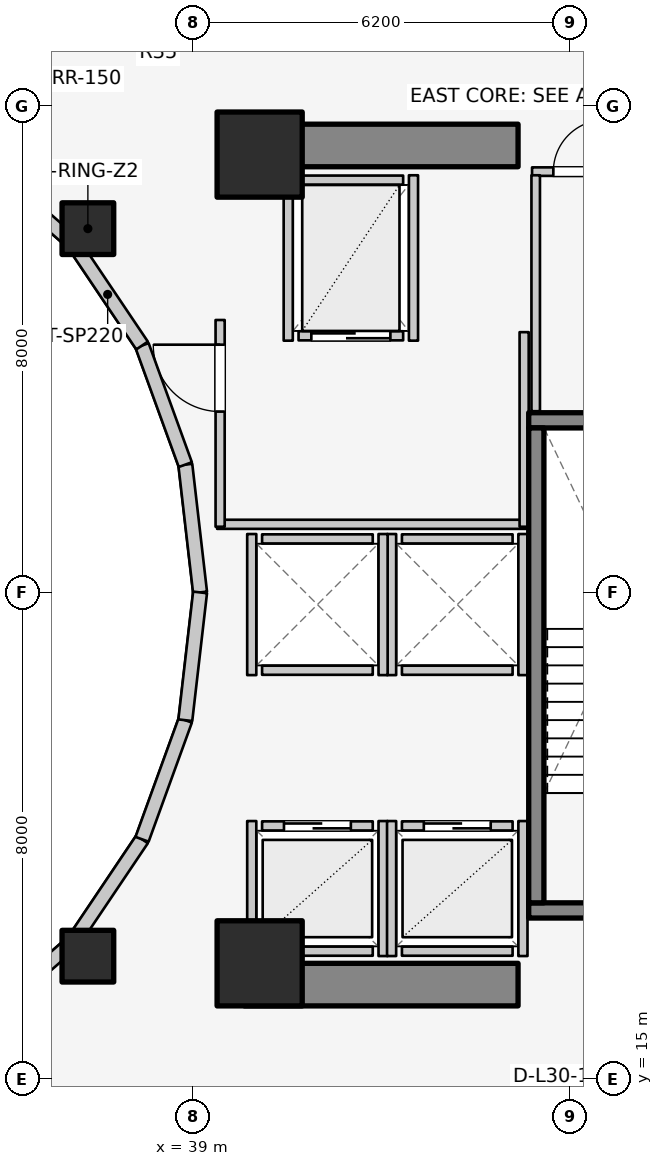
"""IFC4 building model, lengths in metres.
Left out: names, types, materials, properties, quantities, classifications, styles, units other than length and angle.
Written with IfcOpenShell. Run it as: python <this file> out.ifc"""

import sys

from ifc_helpers import new_model, si_unit, direction, frame, frame_2d, origin, origin_2d, place, context, subcontext, project, spatial, rectangle, extrude, element, fill, save


model = new_model("IFC4")
c1 = context("Model", 3, precision=1e-05, world=origin(), true_north=direction((0.0, 1.0)))
c2 = subcontext(c1, "Body", "Model", "MODEL_VIEW")
j1 = project(units=[si_unit("LENGTHUNIT", "METRE"), si_unit("PLANEANGLEUNIT", "RADIAN")], contexts=[c1])
p1 = place(None, origin())
s1 = spatial("IfcSite", under=j1, at=p1, CompositionType="ELEMENT")
p2 = place(p1, origin())
s2 = spatial("IfcBuilding", under=s1, at=p2, CompositionType="ELEMENT")
p3 = place(p2, frame((0.0, 0.0, 101.1)))
s3 = spatial("IfcBuildingStorey", under=s2, at=p3, CompositionType="ELEMENT", Elevation=101.1)
for number, where, z_axis, x_axis in (
    (1, (39.85, 16.55, 0.0), (0.0, 0.0, 1.0), (1.0, 0.0, 0.0)),
    (2, (39.85, 30.35, 0.0), (0.0, 0.0, 1.0), (1.0, 0.0, 0.0)),
):
    element("IfcWall", number, at=place(p3, frame(where, z_axis=z_axis, x_axis=x_axis)), inside=s3, PredefinedType="SHEAR", context=c2, shape_type="SweptSolid", body=[
        extrude(rectangle(XDim=4.5, YDim=0.7, at=frame_2d((2.25, 0.0))), origin(), (0.0, 0.0, 1.0), 3.1),
    ])
p4 = place(p3, frame((44.525, 17.77, 0.0), z_axis=(0.0, 0.0, 1.0), x_axis=(1.0, 0.0, 0.0)))
e3 = element("IfcWall", 3, at=p4, inside=s3, PredefinedType="SOLIDWALL", context=c2, shape_type="SweptSolid", body=[
    extrude(rectangle(XDim=3.37, YDim=0.25, at=frame_2d((1.685, 0.0))), origin(), (0.0, 0.0, 1.0), 3.1),
])
p5 = place(p4, frame((1.135, 0.0, 0.0)))
e4 = element("IfcOpeningElement", 4, at=p5, cuts=e3, PredefinedType="OPENING", context=c2, shape_type="SweptSolid", body=[
    extrude(rectangle(XDim=1.1, YDim=2.1, at=frame_2d((0.55, 1.05))), frame((0.0, 0.135, 0.0), z_axis=(0.0, -1.0, 0.0), x_axis=(1.0, 0.0, 0.0)), (0.0, 0.0, 1.0), 0.27),
])
p6 = place(p3, frame((44.525, 25.83, 0.0), z_axis=(0.0, 0.0, 1.0), x_axis=(1.0, 0.0, 0.0)))
e5 = element("IfcWall", 5, at=p6, inside=s3, PredefinedType="SOLIDWALL", context=c2, shape_type="SweptSolid", body=[
    extrude(rectangle(XDim=3.37, YDim=0.25, at=frame_2d((1.685, 0.0))), origin(), (0.0, 0.0, 1.0), 3.1),
])
p7 = place(p3, frame((44.65, 17.895, 0.0), z_axis=(0.0, 0.0, 1.0), x_axis=(0.0, 1.0, 0.0)))
e6 = element("IfcWall", 6, at=p7, inside=s3, PredefinedType="SOLIDWALL", context=c2, shape_type="SweptSolid", body=[
    extrude(rectangle(XDim=7.81, YDim=0.25, at=frame_2d((3.905, 0.0))), origin(), (0.0, 0.0, 1.0), 3.1),
])
for number, where, z_axis, x_axis in (
    (7, (40.1, 16.9, 0.0), (0.0, 0.0, 1.0), (1.0, 0.0, 0.0)),
    (8, (40.1, 30.2, 0.0), (0.0, 0.0, 1.0), (1.0, 0.0, 0.0)),
):
    element("IfcColumn", number, at=place(p3, frame(where, z_axis=z_axis, x_axis=x_axis)), inside=s3, PredefinedType="COLUMN", context=c2, shape_type="SweptSolid", body=[
        extrude(rectangle(XDim=1.4, YDim=1.4, at=origin_2d()), origin(), (0.0, 0.0, 1.0), 3.1),
    ])
for number, where, z_axis, x_axis in (
    (9, (37.275, 28.982, 0.0), (0.0, 0.0, 1.0), (1.0, 0.0, 0.0)),
    (10, (37.275, 17.018, 0.0), (0.0, 0.0, 1.0), (1.0, 0.0, 0.0)),
):
    element("IfcColumn", number, at=place(p3, frame(where, z_axis=z_axis, x_axis=x_axis)), inside=s3, PredefinedType="COLUMN", context=c2, shape_type="SweptSolid", body=[
        extrude(rectangle(XDim=0.85, YDim=0.85, at=origin_2d()), origin(), (0.0, 0.0, 1.0), 3.1),
    ])
p8 = place(p3, frame((39.12, 23.0, 0.0), z_axis=(0.0, 0.0, 1.0), x_axis=(-0.114711713601, 0.993398823617, 0.0)))
e11 = element("IfcWall", 11, at=p8, inside=s3, PredefinedType="STANDARD", context=c2, shape_type="SweptSolid", body=[
    extrude(rectangle(XDim=2.115, YDim=0.23, at=frame_2d((1.058, 0.0))), origin(), (0.0, 0.0, 1.0), 2.56),
])
p9 = place(p3, frame((38.877, 25.102, 0.0), z_axis=(0.0, 0.0, 1.0), x_axis=(-0.341423187295, 0.93990968033, 0.0)))
e12 = element("IfcWall", 12, at=p9, inside=s3, PredefinedType="STANDARD", context=c2, shape_type="SweptSolid", body=[
    extrude(rectangle(XDim=2.084, YDim=0.23, at=frame_2d((1.042, 0.0))), origin(), (0.0, 0.0, 1.0), 2.56),
])
p10 = place(p3, frame((38.166, 27.06, 0.0), z_axis=(0.0, 0.0, 1.0), x_axis=(-0.558197800898, 0.829707909492, 0.0)))
e13 = element("IfcWall", 13, at=p10, inside=s3, PredefinedType="STANDARD", context=c2, shape_type="SweptSolid", body=[
    extrude(rectangle(XDim=2.027, YDim=0.23, at=frame_2d((1.013, 0.0))), origin(), (0.0, 0.0, 1.0), 1.22),
])
for number, where, z_axis, x_axis in (
    (14, (37.035, 28.742, 0.0), (0.0, 0.0, 1.0), (-0.753, 0.659, 0.0)),
    (15, (35.56, 15.968, 0.0), (0.0, 0.0, 1.0), (0.753, 0.659, 0.0)),
):
    element("IfcWall", number, at=place(p3, frame(where, z_axis=z_axis, x_axis=x_axis)), inside=s3, PredefinedType="STANDARD", context=c2, shape_type="SweptSolid", body=[
        extrude(rectangle(XDim=1.959, YDim=0.23, at=frame_2d((0.98, 0.0))), origin(), (0.0, 0.0, 1.0), 1.22),
    ])
p11 = place(p3, frame((37.035, 17.258, 0.0), z_axis=(0.0, 0.0, 1.0), x_axis=(0.558197800898, 0.829707909492, 0.0)))
e16 = element("IfcWall", 16, at=p11, inside=s3, PredefinedType="STANDARD", context=c2, shape_type="SweptSolid", body=[
    extrude(rectangle(XDim=2.027, YDim=0.23, at=frame_2d((1.013, 0.0))), origin(), (0.0, 0.0, 1.0), 1.22),
])
p12 = place(p3, frame((38.166, 18.94, 0.0), z_axis=(0.0, 0.0, 1.0), x_axis=(0.341423187295, 0.93990968033, 0.0)))
e17 = element("IfcWall", 17, at=p12, inside=s3, PredefinedType="STANDARD", context=c2, shape_type="SweptSolid", body=[
    extrude(rectangle(XDim=2.084, YDim=0.23, at=frame_2d((1.042, 0.0))), origin(), (0.0, 0.0, 1.0), 2.56),
])
p13 = place(p3, frame((38.877, 20.898, 0.0), z_axis=(0.0, 0.0, 1.0), x_axis=(0.114711713601, 0.993398823617, 0.0)))
e18 = element("IfcWall", 18, at=p13, inside=s3, PredefinedType="STANDARD", context=c2, shape_type="SweptSolid", body=[
    extrude(rectangle(XDim=2.115, YDim=0.23, at=frame_2d((1.058, 0.0))), origin(), (0.0, 0.0, 1.0), 2.56),
])
p14 = place(p3, frame((40.14, 19.16, 0.0), z_axis=(0.0, 0.0, 1.0), x_axis=(1.0, 0.0, 0.0)))
e19 = element("IfcWall", 19, at=p14, inside=s3, PredefinedType="SOLIDWALL", context=c2, shape_type="SweptSolid", body=[
    extrude(rectangle(XDim=1.82, YDim=0.15, at=frame_2d((0.91, 0.0))), origin(), (0.0, 0.0, 1.0), 2.12),
])
p15 = place(p14, frame((0.36, 0.0, 0.0)))
e20 = element("IfcOpeningElement", 20, at=p15, cuts=e19, PredefinedType="OPENING", context=c2, shape_type="SweptSolid", body=[
    extrude(rectangle(XDim=1.1, YDim=2.1, at=frame_2d((0.55, 1.05))), frame((0.0, 0.085, 0.0), z_axis=(0.0, -1.0, 0.0), x_axis=(1.0, 0.0, 0.0)), (0.0, 0.0, 1.0), 0.17),
])
p16 = place(p3, frame((40.14, 17.1, 0.0), z_axis=(0.0, 0.0, 1.0), x_axis=(1.0, 0.0, 0.0)))
e21 = element("IfcWall", 21, at=p16, inside=s3, PredefinedType="SOLIDWALL", context=c2, shape_type="SweptSolid", body=[
    extrude(rectangle(XDim=1.82, YDim=0.15, at=frame_2d((0.91, 0.0))), origin(), (0.0, 0.0, 1.0), 2.12),
])
p17 = place(p3, frame((39.97, 17.02, 0.0), z_axis=(0.0, 0.0, 1.0), x_axis=(0.0, 1.0, 0.0)))
e22 = element("IfcWall", 22, at=p17, inside=s3, PredefinedType="SOLIDWALL", context=c2, shape_type="SweptSolid", body=[
    extrude(rectangle(XDim=2.22, YDim=0.15, at=frame_2d((1.11, 0.0))), origin(), (0.0, 0.0, 1.0), 1.873),
])
p18 = place(p3, frame((42.13, 17.02, 0.0), z_axis=(0.0, 0.0, 1.0), x_axis=(0.0, 1.0, 0.0)))
e23 = element("IfcWall", 23, at=p18, inside=s3, PredefinedType="SOLIDWALL", context=c2, shape_type="SweptSolid", body=[
    extrude(rectangle(XDim=2.22, YDim=0.15, at=frame_2d((1.11, 0.0))), origin(), (0.0, 0.0, 1.0), 2.575),
])
p19 = place(p3, frame((42.44, 19.16, 0.0), z_axis=(0.0, 0.0, 1.0), x_axis=(1.0, 0.0, 0.0)))
e24 = element("IfcWall", 24, at=p19, inside=s3, PredefinedType="SOLIDWALL", context=c2, shape_type="SweptSolid", body=[
    extrude(rectangle(XDim=1.82, YDim=0.15, at=frame_2d((0.91, 0.0))), origin(), (0.0, 0.0, 1.0), 2.575),
])
p20 = place(p19, frame((0.36, 0.0, 0.0)))
e25 = element("IfcOpeningElement", 25, at=p20, cuts=e24, PredefinedType="OPENING", context=c2, shape_type="SweptSolid", body=[
    extrude(rectangle(XDim=1.1, YDim=2.1, at=frame_2d((0.55, 1.05))), frame((0.0, 0.085, 0.0), z_axis=(0.0, -1.0, 0.0), x_axis=(1.0, 0.0, 0.0)), (0.0, 0.0, 1.0), 0.17),
])
p21 = place(p3, frame((42.44, 17.1, 0.0), z_axis=(0.0, 0.0, 1.0), x_axis=(1.0, 0.0, 0.0)))
e26 = element("IfcWall", 26, at=p21, inside=s3, PredefinedType="SOLIDWALL", context=c2, shape_type="SweptSolid", body=[
    extrude(rectangle(XDim=1.82, YDim=0.15, at=frame_2d((0.91, 0.0))), origin(), (0.0, 0.0, 1.0), 2.575),
])
p22 = place(p3, frame((42.27, 17.02, 0.0), z_axis=(0.0, 0.0, 1.0), x_axis=(0.0, 1.0, 0.0)))
e27 = element("IfcWall", 27, at=p22, inside=s3, PredefinedType="SOLIDWALL", context=c2, shape_type="SweptSolid", body=[
    extrude(rectangle(XDim=2.22, YDim=0.15, at=frame_2d((1.11, 0.0))), origin(), (0.0, 0.0, 1.0), 2.575),
])
p23 = place(p3, frame((44.43, 17.02, 0.0), z_axis=(0.0, 0.0, 1.0), x_axis=(0.0, 1.0, 0.0)))
e28 = element("IfcWall", 28, at=p23, inside=s3, PredefinedType="SOLIDWALL", context=c2, shape_type="SweptSolid", body=[
    extrude(rectangle(XDim=2.22, YDim=0.15, at=frame_2d((1.11, 0.0))), origin(), (0.0, 0.0, 1.0), 2.12),
])
for number, where, z_axis, x_axis in (
    (29, (42.44, 21.72, 0.0), (0.0, 0.0, 1.0), (1.0, 0.0, 0.0)),
    (30, (42.44, 23.88, 0.0), (0.0, 0.0, 1.0), (1.0, 0.0, 0.0)),
):
    element("IfcWall", number, at=place(p3, frame(where, z_axis=z_axis, x_axis=x_axis)), inside=s3, PredefinedType="SOLIDWALL", context=c2, shape_type="SweptSolid", body=[
        extrude(rectangle(XDim=1.82, YDim=0.15, at=frame_2d((0.91, 0.0))), origin(), (0.0, 0.0, 1.0), 2.575),
    ])
for number, where, z_axis, x_axis in (
    (31, (42.27, 21.64, 0.0), (0.0, 0.0, 1.0), (0.0, 1.0, 0.0)),
    (32, (44.43, 21.64, 0.0), (0.0, 0.0, 1.0), (0.0, 1.0, 0.0)),
):
    element("IfcWall", number, at=place(p3, frame(where, z_axis=z_axis, x_axis=x_axis)), inside=s3, PredefinedType="SOLIDWALL", context=c2, shape_type="SweptSolid", body=[
        extrude(rectangle(XDim=2.32, YDim=0.15, at=frame_2d((1.16, 0.0))), origin(), (0.0, 0.0, 1.0), 2.575),
    ])
for number, where, z_axis, x_axis in (
    (33, (40.14, 21.72, 0.0), (0.0, 0.0, 1.0), (1.0, 0.0, 0.0)),
    (34, (40.14, 23.88, 0.0), (0.0, 0.0, 1.0), (1.0, 0.0, 0.0)),
):
    element("IfcWall", number, at=place(p3, frame(where, z_axis=z_axis, x_axis=x_axis)), inside=s3, PredefinedType="SOLIDWALL", context=c2, shape_type="SweptSolid", body=[
        extrude(rectangle(XDim=1.82, YDim=0.15, at=frame_2d((0.91, 0.0))), origin(), (0.0, 0.0, 1.0), 2.12),
    ])
p24 = place(p3, frame((39.97, 21.64, 0.0), z_axis=(0.0, 0.0, 1.0), x_axis=(0.0, 1.0, 0.0)))
e35 = element("IfcWall", 35, at=p24, inside=s3, PredefinedType="SOLIDWALL", context=c2, shape_type="SweptSolid", body=[
    extrude(rectangle(XDim=2.32, YDim=0.15, at=frame_2d((1.16, 0.0))), origin(), (0.0, 0.0, 1.0), 2.12),
])
p25 = place(p3, frame((42.13, 21.64, 0.0), z_axis=(0.0, 0.0, 1.0), x_axis=(0.0, 1.0, 0.0)))
e36 = element("IfcWall", 36, at=p25, inside=s3, PredefinedType="SOLIDWALL", context=c2, shape_type="SweptSolid", body=[
    extrude(rectangle(XDim=2.32, YDim=0.15, at=frame_2d((1.16, 0.0))), origin(), (0.0, 0.0, 1.0), 2.575),
])
p26 = place(p3, frame((40.74, 27.22, 0.0), z_axis=(0.0, 0.0, 1.0), x_axis=(1.0, 0.0, 0.0)))
e37 = element("IfcWall", 37, at=p26, inside=s3, PredefinedType="SOLIDWALL", context=c2, shape_type="SweptSolid", body=[
    extrude(rectangle(XDim=1.72, YDim=0.15, at=frame_2d((0.86, 0.0))), origin(), (0.0, 0.0, 1.0), 2.575),
])
p27 = place(p26, frame((0.21, 0.0, 0.0)))
e38 = element("IfcOpeningElement", 38, at=p27, cuts=e37, PredefinedType="OPENING", context=c2, shape_type="SweptSolid", body=[
    extrude(rectangle(XDim=1.3, YDim=2.1, at=frame_2d((0.65, 1.05))), frame((0.0, 0.085, 0.0), z_axis=(0.0, -1.0, 0.0), x_axis=(1.0, 0.0, 0.0)), (0.0, 0.0, 1.0), 0.17),
])
p28 = place(p3, frame((40.74, 29.78, 0.0), z_axis=(0.0, 0.0, 1.0), x_axis=(1.0, 0.0, 0.0)))
e39 = element("IfcWall", 39, at=p28, inside=s3, PredefinedType="SOLIDWALL", context=c2, shape_type="SweptSolid", body=[
    extrude(rectangle(XDim=1.72, YDim=0.15, at=frame_2d((0.86, 0.0))), origin(), (0.0, 0.0, 1.0), 2.575),
])
for number, where, z_axis, x_axis in (
    (40, (40.57, 27.14, 0.0), (0.0, 0.0, 1.0), (0.0, 1.0, 0.0)),
    (41, (42.63, 27.14, 0.0), (0.0, 0.0, 1.0), (0.0, 1.0, 0.0)),
):
    element("IfcWall", number, at=place(p3, frame(where, z_axis=z_axis, x_axis=x_axis)), inside=s3, PredefinedType="SOLIDWALL", context=c2, shape_type="SweptSolid", body=[
        extrude(rectangle(XDim=2.72, YDim=0.15, at=frame_2d((1.36, 0.0))), origin(), (0.0, 0.0, 1.0), 2.575),
    ])
p29 = place(p3, frame((39.4, 24.12, 0.0), z_axis=(0.0, 0.0, 1.0), x_axis=(1.0, 0.0, 0.0)))
e42 = element("IfcWall", 42, at=p29, inside=s3, PredefinedType="PARTITIONING", context=c2, shape_type="SweptSolid", body=[
    extrude(rectangle(XDim=5.08, YDim=0.15, at=frame_2d((2.54, 0.0))), origin(), (0.0, 0.0, 1.0), 2.12),
])
p30 = place(p3, frame((44.45, 24.08, 0.0), z_axis=(0.0, 0.0, 1.0), x_axis=(0.0, 1.0, 0.0)))
e43 = element("IfcWall", 43, at=p30, inside=s3, PredefinedType="PARTITIONING", context=c2, shape_type="SweptSolid", body=[
    extrude(rectangle(XDim=3.2, YDim=0.15, at=frame_2d((1.6, 0.0))), origin(), (0.0, 0.0, 1.0), 2.575),
])
p31 = place(p3, frame((39.45, 24.08, 0.0), z_axis=(0.0, 0.0, 1.0), x_axis=(0.0, 1.0, 0.0)))
e44 = element("IfcWall", 44, at=p31, inside=s3, PredefinedType="PARTITIONING", context=c2, shape_type="SweptSolid", body=[
    extrude(rectangle(XDim=3.4, YDim=0.15, at=frame_2d((1.7, 0.0))), origin(), (0.0, 0.0, 1.0), 2.575),
])
p32 = place(p31, frame((1.894, 0.0, 0.0)))
e45 = element("IfcOpeningElement", 45, at=p32, cuts=e44, PredefinedType="OPENING", context=c2, shape_type="SweptSolid", body=[
    extrude(rectangle(XDim=1.1, YDim=2.1, at=frame_2d((0.55, 1.05))), frame((0.0, 0.085, 0.0), z_axis=(0.0, -1.0, 0.0), x_axis=(1.0, 0.0, 0.0)), (0.0, 0.0, 1.0), 0.17),
])
p33 = place(p3, frame((44.58, 29.92, 0.0), z_axis=(0.0, 0.0, 1.0), x_axis=(1.0, 0.0, 0.0)))
e46 = element("IfcWall", 46, at=p33, inside=s3, PredefinedType="PLUMBINGWALL", context=c2, shape_type="SweptSolid", body=[
    extrude(rectangle(XDim=1.6, YDim=0.14, at=frame_2d((0.8, 0.0))), origin(), (0.0, 0.0, 1.0), 2.575),
])
p34 = place(p33, frame((0.35, 0.0, 0.0)))
e47 = element("IfcOpeningElement", 47, at=p34, cuts=e46, PredefinedType="OPENING", context=c2, shape_type="SweptSolid", body=[
    extrude(rectangle(XDim=0.85, YDim=2.05, at=frame_2d((0.425, 1.025))), frame((0.0, 0.08, 0.0), z_axis=(0.0, -1.0, 0.0), x_axis=(1.0, 0.0, 0.0)), (0.0, 0.0, 1.0), 0.16),
])
p35 = place(p3, frame((44.64, 25.98, 0.0), z_axis=(0.0, 0.0, 1.0), x_axis=(0.0, 1.0, 0.0)))
e48 = element("IfcWall", 48, at=p35, inside=s3, PredefinedType="PLUMBINGWALL", context=c2, shape_type="SweptSolid", body=[
    extrude(rectangle(XDim=3.88, YDim=0.14, at=frame_2d((1.94, 0.0))), origin(), (0.0, 0.0, 1.0), 2.575),
])
p36 = place(p15, origin())
e49 = element("IfcDoor", 49, at=p36, inside=s3, OperationType="DOUBLE_DOOR_SLIDING", PredefinedType="DOOR", context=c2, shape_type="SweptSolid", body=[
    extrude(rectangle(XDim=1.1, YDim=2.1, at=frame_2d((0.55, 1.05))), frame((0.0, 0.025, 0.0), z_axis=(0.0, -1.0, 0.0), x_axis=(1.0, 0.0, 0.0)), (0.0, 0.0, 1.0), 0.05),
])
fill(e20, e49)
p37 = place(p20, origin())
e50 = element("IfcDoor", 50, at=p37, inside=s3, OperationType="DOUBLE_DOOR_SLIDING", PredefinedType="DOOR", context=c2, shape_type="SweptSolid", body=[
    extrude(rectangle(XDim=1.1, YDim=2.1, at=frame_2d((0.55, 1.05))), frame((0.0, 0.025, 0.0), z_axis=(0.0, -1.0, 0.0), x_axis=(1.0, 0.0, 0.0)), (0.0, 0.0, 1.0), 0.05),
])
fill(e25, e50)
p38 = place(p27, origin())
e51 = element("IfcDoor", 51, at=p38, inside=s3, OperationType="DOUBLE_DOOR_SLIDING", PredefinedType="DOOR", context=c2, shape_type="SweptSolid", body=[
    extrude(rectangle(XDim=1.3, YDim=2.1, at=frame_2d((0.65, 1.05))), frame((0.0, 0.025, 0.0), z_axis=(0.0, -1.0, 0.0), x_axis=(1.0, 0.0, 0.0)), (0.0, 0.0, 1.0), 0.05),
])
fill(e38, e51)
p39 = place(p32, origin())
e52 = element("IfcDoor", 52, at=p39, inside=s3, OperationType="SINGLE_SWING_RIGHT", PredefinedType="DOOR", context=c2, shape_type="SweptSolid", body=[
    extrude(rectangle(XDim=1.1, YDim=2.1, at=frame_2d((0.55, 1.05))), frame((0.0, 0.025, 0.0), z_axis=(0.0, -1.0, 0.0), x_axis=(1.0, 0.0, 0.0)), (0.0, 0.0, 1.0), 0.05),
])
fill(e45, e52)
p40 = place(p34, origin())
e53 = element("IfcDoor", 53, at=p40, inside=s3, OperationType="SINGLE_SWING_RIGHT", PredefinedType="DOOR", context=c2, shape_type="SweptSolid", body=[
    extrude(rectangle(XDim=0.85, YDim=2.05, at=frame_2d((0.425, 1.025))), frame((0.0, 0.025, 0.0), z_axis=(0.0, -1.0, 0.0), x_axis=(1.0, 0.0, 0.0)), (0.0, 0.0, 1.0), 0.05),
])
fill(e47, e53)
save(model, sys.argv[1])
